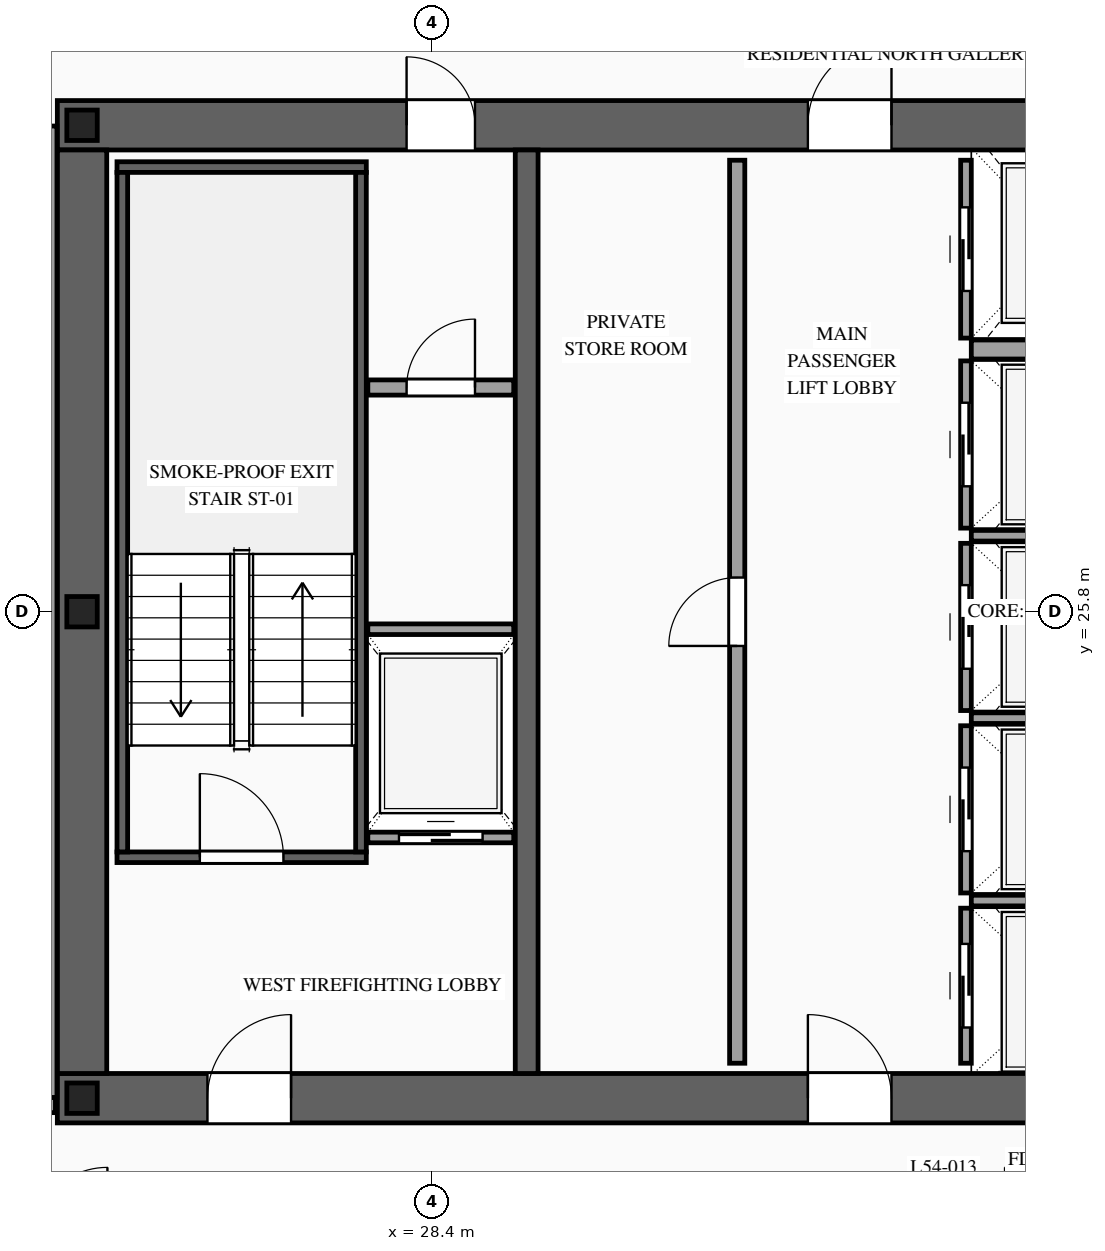
"""IFC4 building model, lengths in metres.
Left out: names, types, materials, properties, quantities, classifications, styles, units other than length and angle.
Written with IfcOpenShell. Run it as: python <this file> out.ifc"""

import sys

from ifc_helpers import new_model, si_unit, direction, frame, frame_2d, origin, origin_2d, place, context, subcontext, project, spatial, rectangle, i_section, extrude, source, transform, mapped, element, fill, save


model = new_model("IFC4")
c1 = context("Model", 3, precision=1e-05, world=origin(), true_north=direction((0.0, 1.0)))
c2 = subcontext(c1, "Body", "Model", "MODEL_VIEW")
j1 = project(units=[si_unit("LENGTHUNIT", "METRE"), si_unit("PLANEANGLEUNIT", "RADIAN")], contexts=[c1])
p1 = place(None, origin())
s1 = spatial("IfcSite", under=j1, at=p1, CompositionType="ELEMENT")
p2 = place(p1, origin())
s2 = spatial("IfcBuilding", under=s1, at=p2, CompositionType="ELEMENT")
p3 = place(p2, frame((0.0, 0.0, 205.5)))
s3 = spatial("IfcBuildingStorey", under=s2, at=p3, CompositionType="ELEMENT", Elevation=205.5)
p4 = place(p3, frame((23.475, 19.4, 0.0), z_axis=(0.0, 0.0, 1.0), x_axis=(1.0, 0.0, 0.0)))
e1 = element("IfcWall", 1, at=p4, inside=s3, PredefinedType="SHEAR", context=c2, shape_type="SweptSolid", body=[
    extrude(rectangle(XDim=27.05, YDim=0.65, at=frame_2d((13.525, 0.0))), origin(), (0.0, 0.0, 1.0), 3.5),
])
p5 = place(p4, frame((1.975, 0.0, 0.0)))
e2 = element("IfcOpeningElement", 2, at=p5, cuts=e1, PredefinedType="OPENING", context=c2, shape_type="SweptSolid", body=[
    extrude(rectangle(XDim=1.1, YDim=2.2, at=frame_2d((0.55, 1.1))), frame((0.0, 0.34, 0.0), z_axis=(0.0, -1.0, 0.0), x_axis=(1.0, 0.0, 0.0)), (0.0, 0.0, 1.0), 0.68),
])
p6 = place(p4, frame((9.875, 0.0, 0.0)))
e3 = element("IfcOpeningElement", 3, at=p6, cuts=e1, PredefinedType="OPENING", context=c2, shape_type="SweptSolid", body=[
    extrude(rectangle(XDim=1.1, YDim=2.2, at=frame_2d((0.55, 1.1))), frame((0.0, 0.34, 0.0), z_axis=(0.0, -1.0, 0.0), x_axis=(1.0, 0.0, 0.0)), (0.0, 0.0, 1.0), 0.68),
])
p7 = place(p4, frame((23.075, 0.0, 0.0)))
e4 = element("IfcOpeningElement", 4, at=p7, cuts=e1, PredefinedType="OPENING", context=c2, shape_type="SweptSolid", body=[
    extrude(rectangle(XDim=1.1, YDim=2.2, at=frame_2d((0.55, 1.1))), frame((0.0, 0.34, 0.0), z_axis=(0.0, -1.0, 0.0), x_axis=(1.0, 0.0, 0.0)), (0.0, 0.0, 1.0), 0.68),
])
p8 = place(p4, frame((19.695, 0.0, 0.0)))
e5 = element("IfcOpeningElement", 5, at=p8, cuts=e1, PredefinedType="OPENING", context=c2, shape_type="SweptSolid", body=[
    extrude(rectangle(XDim=0.9, YDim=2.15, at=frame_2d((0.45, 1.075))), frame((0.0, 0.34, 0.0), z_axis=(0.0, -1.0, 0.0), x_axis=(1.0, 0.0, 0.0)), (0.0, 0.0, 1.0), 0.68),
])
p9 = place(p4, frame((18.255, 0.0, 0.0)))
e6 = element("IfcOpeningElement", 6, at=p9, cuts=e1, PredefinedType="OPENING", context=c2, shape_type="SweptSolid", body=[
    extrude(rectangle(XDim=0.9, YDim=2.15, at=frame_2d((0.45, 1.075))), frame((0.0, 0.34, 0.0), z_axis=(0.0, -1.0, 0.0), x_axis=(1.0, 0.0, 0.0)), (0.0, 0.0, 1.0), 0.68),
])
p10 = place(p3, frame((23.475, 32.2, 0.0), z_axis=(0.0, 0.0, 1.0), x_axis=(1.0, 0.0, 0.0)))
e7 = element("IfcWall", 7, at=p10, inside=s3, PredefinedType="SHEAR", context=c2, shape_type="SweptSolid", body=[
    extrude(rectangle(XDim=27.05, YDim=0.65, at=frame_2d((13.525, 0.0))), origin(), (0.0, 0.0, 1.0), 3.5),
])
p11 = place(p10, frame((4.595, 0.0, 0.0)))
e8 = element("IfcOpeningElement", 8, at=p11, cuts=e7, PredefinedType="OPENING", context=c2, shape_type="SweptSolid", body=[
    extrude(rectangle(XDim=0.9, YDim=2.15, at=frame_2d((0.45, 1.075))), frame((0.0, 0.34, 0.0), z_axis=(0.0, -1.0, 0.0), x_axis=(1.0, 0.0, 0.0)), (0.0, 0.0, 1.0), 0.68),
])
p12 = place(p10, frame((9.875, 0.0, 0.0)))
e9 = element("IfcOpeningElement", 9, at=p12, cuts=e7, PredefinedType="OPENING", context=c2, shape_type="SweptSolid", body=[
    extrude(rectangle(XDim=1.1, YDim=2.2, at=frame_2d((0.55, 1.1))), frame((0.0, 0.34, 0.0), z_axis=(0.0, -1.0, 0.0), x_axis=(1.0, 0.0, 0.0)), (0.0, 0.0, 1.0), 0.68),
])
p13 = place(p10, frame((15.725, 0.0, 0.0)))
e10 = element("IfcOpeningElement", 10, at=p13, cuts=e7, PredefinedType="OPENING", context=c2, shape_type="SweptSolid", body=[
    extrude(rectangle(XDim=1.1, YDim=2.2, at=frame_2d((0.55, 1.1))), frame((0.0, 0.34, 0.0), z_axis=(0.0, -1.0, 0.0), x_axis=(1.0, 0.0, 0.0)), (0.0, 0.0, 1.0), 0.68),
])
m1 = source(origin(), c2, "Body", "SweptSolid", [
    extrude(rectangle(XDim=12.15, YDim=0.65, at=frame_2d((6.075, 0.0))), origin(), (0.0, 0.0, 1.0), 3.5),
])
p14 = place(p3, frame((23.8, 19.725, 0.0), z_axis=(0.0, 0.0, 1.0), x_axis=(0.0, 1.0, 0.0)))
e11 = element("IfcWall", 11, at=p14, inside=s3, PredefinedType="SHEAR", context=c2, shape_type="MappedRepresentation", body=[
    mapped(m1, transform((0.0, 0.0, 0.0), scale=1.0)),
])
m2 = source(origin(), c2, "Body", "SweptSolid", [
    extrude(rectangle(XDim=12.15, YDim=0.3, at=frame_2d((6.075, 0.0))), origin(), (0.0, 0.0, 1.0), 3.5),
])
p15 = place(p3, frame((29.65, 19.725, 0.0), z_axis=(0.0, 0.0, 1.0), x_axis=(0.0, 1.0, 0.0)))
e12 = element("IfcWall", 12, at=p15, inside=s3, PredefinedType="SOLIDWALL", context=c2, shape_type="MappedRepresentation", body=[
    mapped(m2, transform((0.0, 0.0, 0.0), scale=1.0)),
])
m3 = source(origin(), c2, "Body", "SweptSolid", [
    extrude(i_section(OverallWidth=0.4, OverallDepth=0.4, WebThickness=0.013, FlangeThickness=0.021, at=origin_2d()), origin(), (0.0, 0.0, 1.0), 3.5),
])
for number, where, z_axis, x_axis in (
    (13, (23.8, 19.4, 0.0), (0.0, 0.0, 1.0), (1.0, 0.0, 0.0)),
    (14, (23.8, 25.8, 0.0), (0.0, 0.0, 1.0), (1.0, 0.0, 0.0)),
    (15, (23.8, 32.2, 0.0), (0.0, 0.0, 1.0), (1.0, 0.0, 0.0)),
):
    element("IfcColumn", number, at=place(p3, frame(where, z_axis=z_axis, x_axis=x_axis)), inside=s3, PredefinedType="COLUMN", context=c2, shape_type="MappedRepresentation", body=[
        mapped(m3, transform((0.0, 0.0, 0.0), scale=1.0)),
    ])
p16 = place(p3, frame((27.56, 22.83, 0.0), z_axis=(0.0, 0.0, 1.0), x_axis=(1.0, 0.0, 0.0)))
e16 = element("IfcWall", 16, at=p16, inside=s3, PredefinedType="SOLIDWALL", context=c2, shape_type="SweptSolid", body=[
    extrude(rectangle(XDim=1.92, YDim=0.14, at=frame_2d((0.96, 0.0))), origin(), (0.0, 0.0, 1.0), 3.28),
])
p17 = place(p16, frame((0.41, 0.0, 0.0)))
e17 = element("IfcOpeningElement", 17, at=p17, cuts=e16, PredefinedType="OPENING", context=c2, shape_type="SweptSolid", body=[
    extrude(rectangle(XDim=1.1, YDim=2.2, at=frame_2d((0.55, 1.1))), frame((0.0, 0.085, 0.0), z_axis=(0.0, -1.0, 0.0), x_axis=(1.0, 0.0, 0.0)), (0.0, 0.0, 1.0), 0.17),
])
m4 = source(origin(), c2, "Body", "SweptSolid", [
    extrude(rectangle(XDim=1.92, YDim=0.14, at=frame_2d((0.96, 0.0))), origin(), (0.0, 0.0, 1.0), 3.28),
])
p18 = place(p3, frame((27.56, 25.57, 0.0), z_axis=(0.0, 0.0, 1.0), x_axis=(1.0, 0.0, 0.0)))
e18 = element("IfcWall", 18, at=p18, inside=s3, PredefinedType="SOLIDWALL", context=c2, shape_type="MappedRepresentation", body=[
    mapped(m4, transform((0.0, 0.0, 0.0), scale=1.0)),
])
p19 = place(p3, frame((35.43, 19.86, 0.0), z_axis=(0.0, 0.0, 1.0), x_axis=(0.0, 1.0, 0.0)))
e19 = element("IfcWall", 19, at=p19, inside=s3, PredefinedType="SOLIDWALL", context=c2, shape_type="SweptSolid", body=[
    extrude(rectangle(XDim=2.04, YDim=0.14, at=frame_2d((1.02, 0.0))), origin(), (0.0, 0.0, 1.0), 3.28),
])
p20 = place(p19, frame((0.47, 0.0, 0.0)))
e20 = element("IfcOpeningElement", 20, at=p20, cuts=e19, PredefinedType="OPENING", context=c2, shape_type="SweptSolid", body=[
    extrude(rectangle(XDim=1.1, YDim=2.2, at=frame_2d((0.55, 1.1))), frame((0.0, 0.085, 0.0), z_axis=(0.0, -1.0, 0.0), x_axis=(1.0, 0.0, 0.0)), (0.0, 0.0, 1.0), 0.17),
])
m5 = source(origin(), c2, "Body", "SweptSolid", [
    extrude(rectangle(XDim=2.4, YDim=0.14, at=frame_2d((1.2, 0.0))), origin(), (0.0, 0.0, 1.0), 3.28),
])
p21 = place(p3, frame((35.5, 22.0, 0.0), z_axis=(0.0, 0.0, 1.0), x_axis=(1.0, 0.0, 0.0)))
e21 = element("IfcWall", 21, at=p21, inside=s3, PredefinedType="SOLIDWALL", context=c2, shape_type="MappedRepresentation", body=[
    mapped(m5, transform((0.0, 0.0, 0.0), scale=1.0)),
])
p22 = place(p3, frame((35.43, 22.1, 0.0), z_axis=(0.0, 0.0, 1.0), x_axis=(0.0, 1.0, 0.0)))
e22 = element("IfcWall", 22, at=p22, inside=s3, PredefinedType="SOLIDWALL", context=c2, shape_type="SweptSolid", body=[
    extrude(rectangle(XDim=2.2, YDim=0.14, at=frame_2d((1.1, 0.0))), origin(), (0.0, 0.0, 1.0), 3.28),
])
p23 = place(p22, frame((0.55, 0.0, 0.0)))
e23 = element("IfcOpeningElement", 23, at=p23, cuts=e22, PredefinedType="OPENING", context=c2, shape_type="SweptSolid", body=[
    extrude(rectangle(XDim=1.1, YDim=2.2, at=frame_2d((0.55, 1.1))), frame((0.0, 0.085, 0.0), z_axis=(0.0, -1.0, 0.0), x_axis=(1.0, 0.0, 0.0)), (0.0, 0.0, 1.0), 0.17),
])
p24 = place(p3, frame((35.5, 24.4, 0.0), z_axis=(0.0, 0.0, 1.0), x_axis=(1.0, 0.0, 0.0)))
e24 = element("IfcWall", 24, at=p24, inside=s3, PredefinedType="SOLIDWALL", context=c2, shape_type="MappedRepresentation", body=[
    mapped(m5, transform((0.0, 0.0, 0.0), scale=1.0)),
])
p25 = place(p3, frame((35.43, 24.5, 0.0), z_axis=(0.0, 0.0, 1.0), x_axis=(0.0, 1.0, 0.0)))
e25 = element("IfcWall", 25, at=p25, inside=s3, PredefinedType="SOLIDWALL", context=c2, shape_type="SweptSolid", body=[
    extrude(rectangle(XDim=2.2, YDim=0.14, at=frame_2d((1.1, 0.0))), origin(), (0.0, 0.0, 1.0), 3.28),
])
p26 = place(p25, frame((0.55, 0.0, 0.0)))
e26 = element("IfcOpeningElement", 26, at=p26, cuts=e25, PredefinedType="OPENING", context=c2, shape_type="SweptSolid", body=[
    extrude(rectangle(XDim=1.1, YDim=2.2, at=frame_2d((0.55, 1.1))), frame((0.0, 0.085, 0.0), z_axis=(0.0, -1.0, 0.0), x_axis=(1.0, 0.0, 0.0)), (0.0, 0.0, 1.0), 0.17),
])
p27 = place(p3, frame((35.5, 26.8, 0.0), z_axis=(0.0, 0.0, 1.0), x_axis=(1.0, 0.0, 0.0)))
e27 = element("IfcWall", 27, at=p27, inside=s3, PredefinedType="SOLIDWALL", context=c2, shape_type="MappedRepresentation", body=[
    mapped(m5, transform((0.0, 0.0, 0.0), scale=1.0)),
])
p28 = place(p3, frame((35.43, 26.9, 0.0), z_axis=(0.0, 0.0, 1.0), x_axis=(0.0, 1.0, 0.0)))
e28 = element("IfcWall", 28, at=p28, inside=s3, PredefinedType="SOLIDWALL", context=c2, shape_type="SweptSolid", body=[
    extrude(rectangle(XDim=2.2, YDim=0.14, at=frame_2d((1.1, 0.0))), origin(), (0.0, 0.0, 1.0), 3.28),
])
p29 = place(p28, frame((0.55, 0.0, 0.0)))
e29 = element("IfcOpeningElement", 29, at=p29, cuts=e28, PredefinedType="OPENING", context=c2, shape_type="SweptSolid", body=[
    extrude(rectangle(XDim=1.1, YDim=2.2, at=frame_2d((0.55, 1.1))), frame((0.0, 0.085, 0.0), z_axis=(0.0, -1.0, 0.0), x_axis=(1.0, 0.0, 0.0)), (0.0, 0.0, 1.0), 0.17),
])
p30 = place(p3, frame((35.43, 29.4, 0.0), z_axis=(0.0, 0.0, 1.0), x_axis=(0.0, 1.0, 0.0)))
e30 = element("IfcWall", 30, at=p30, inside=s3, PredefinedType="SOLIDWALL", context=c2, shape_type="SweptSolid", body=[
    extrude(rectangle(XDim=2.34, YDim=0.14, at=frame_2d((1.17, 0.0))), origin(), (0.0, 0.0, 1.0), 3.28),
])
p31 = place(p30, frame((0.62, 0.0, 0.0)))
e31 = element("IfcOpeningElement", 31, at=p31, cuts=e30, PredefinedType="OPENING", context=c2, shape_type="SweptSolid", body=[
    extrude(rectangle(XDim=1.1, YDim=2.2, at=frame_2d((0.55, 1.1))), frame((0.0, 0.085, 0.0), z_axis=(0.0, -1.0, 0.0), x_axis=(1.0, 0.0, 0.0)), (0.0, 0.0, 1.0), 0.17),
])
m6 = source(origin(), c2, "Body", "SweptSolid", [
    extrude(rectangle(XDim=2.4, YDim=0.25, at=frame_2d((1.2, 0.0))), origin(), (0.0, 0.0, 1.0), 3.28),
])
p32 = place(p3, frame((35.5, 29.25, 0.0), z_axis=(0.0, 0.0, 1.0), x_axis=(1.0, 0.0, 0.0)))
e32 = element("IfcWall", 32, at=p32, inside=s3, PredefinedType="SOLIDWALL", context=c2, shape_type="MappedRepresentation", body=[
    mapped(m6, transform((0.0, 0.0, 0.0), scale=1.0)),
])
p33 = place(p3, frame((24.26, 22.57, 0.0), z_axis=(0.0, 0.0, 1.0), x_axis=(1.0, 0.0, 0.0)))
e33 = element("IfcWall", 33, at=p33, inside=s3, PredefinedType="SOLIDWALL", context=c2, shape_type="SweptSolid", body=[
    extrude(rectangle(XDim=3.28, YDim=0.14, at=frame_2d((1.64, 0.0))), origin(), (0.0, 0.0, 1.0), 3.28),
])
p34 = place(p33, frame((1.09, 0.0, 0.0)))
e34 = element("IfcOpeningElement", 34, at=p34, cuts=e33, PredefinedType="OPENING", context=c2, shape_type="SweptSolid", body=[
    extrude(rectangle(XDim=1.1, YDim=2.2, at=frame_2d((0.55, 1.1))), frame((0.0, 0.085, 0.0), z_axis=(0.0, -1.0, 0.0), x_axis=(1.0, 0.0, 0.0)), (0.0, 0.0, 1.0), 0.17),
])
m7 = source(origin(), c2, "Body", "SweptSolid", [
    extrude(rectangle(XDim=3.28, YDim=0.14, at=frame_2d((1.64, 0.0))), origin(), (0.0, 0.0, 1.0), 3.28),
])
p35 = place(p3, frame((24.26, 31.65, 0.0), z_axis=(0.0, 0.0, 1.0), x_axis=(1.0, 0.0, 0.0)))
e35 = element("IfcWall", 35, at=p35, inside=s3, PredefinedType="SOLIDWALL", context=c2, shape_type="MappedRepresentation", body=[
    mapped(m7, transform((0.0, 0.0, 0.0), scale=1.0)),
])
m8 = source(origin(), c2, "Body", "SweptSolid", [
    extrude(rectangle(XDim=8.94, YDim=0.14, at=frame_2d((4.47, 0.0))), origin(), (0.0, 0.0, 1.0), 3.28),
])
for number, where, z_axis, x_axis in (
    (36, (24.33, 22.64, 0.0), (0.0, 0.0, 1.0), (0.0, 1.0, 0.0)),
    (37, (27.47, 22.64, 0.0), (0.0, 0.0, 1.0), (0.0, 1.0, 0.0)),
):
    element("IfcWall", number, at=place(p3, frame(where, z_axis=z_axis, x_axis=x_axis)), inside=s3, PredefinedType="SOLIDWALL", context=c2, shape_type="MappedRepresentation", body=[
        mapped(m8, transform((0.0, 0.0, 0.0), scale=1.0)),
    ])
p36 = place(p3, frame((27.56, 28.75, 0.0), z_axis=(0.0, 0.0, 1.0), x_axis=(1.0, 0.0, 0.0)))
e38 = element("IfcWall", 38, at=p36, inside=s3, PredefinedType="PARTITIONING", context=c2, shape_type="SweptSolid", body=[
    extrude(rectangle(XDim=1.92, YDim=0.2, at=frame_2d((0.96, 0.0))), origin(), (0.0, 0.0, 1.0), 3.28),
])
p37 = place(p36, frame((0.51, 0.0, 0.0)))
e39 = element("IfcOpeningElement", 39, at=p37, cuts=e38, PredefinedType="OPENING", context=c2, shape_type="SweptSolid", body=[
    extrude(rectangle(XDim=0.9, YDim=2.15, at=frame_2d((0.45, 1.075))), frame((0.0, 0.115, 0.0), z_axis=(0.0, -1.0, 0.0), x_axis=(1.0, 0.0, 0.0)), (0.0, 0.0, 1.0), 0.23),
])
p38 = place(p3, frame((32.42, 19.86, 0.0), z_axis=(0.0, 0.0, 1.0), x_axis=(0.0, 1.0, 0.0)))
e40 = element("IfcWall", 40, at=p38, inside=s3, PredefinedType="PARTITIONING", context=c2, shape_type="SweptSolid", body=[
    extrude(rectangle(XDim=11.88, YDim=0.2, at=frame_2d((5.94, 0.0))), origin(), (0.0, 0.0, 1.0), 3.28),
])
p39 = place(p38, frame((5.49, 0.0, 0.0)))
e41 = element("IfcOpeningElement", 41, at=p39, cuts=e40, PredefinedType="OPENING", context=c2, shape_type="SweptSolid", body=[
    extrude(rectangle(XDim=0.9, YDim=2.15, at=frame_2d((0.45, 1.075))), frame((0.0, 0.115, 0.0), z_axis=(0.0, -1.0, 0.0), x_axis=(1.0, 0.0, 0.0)), (0.0, 0.0, 1.0), 0.23),
])
m9 = source(origin(), c2, "Body", "SweptSolid", [
    extrude(rectangle(XDim=8.4, YDim=0.2, at=frame_2d((4.2, 0.0))), origin(), (0.0, 0.0, 1.0), 2.775),
])
p40 = place(p3, frame((15.05, 19.31, 0.0), z_axis=(0.0, 0.0, 1.0), x_axis=(1.0, 0.0, 0.0)))
e42 = element("IfcWall", 42, at=p40, inside=s3, PredefinedType="PARTITIONING", context=c2, shape_type="MappedRepresentation", body=[
    mapped(m9, transform((0.0, 0.0, 0.0), scale=1.0)),
])
m10 = source(origin(), c2, "Body", "SweptSolid", [
    extrude(rectangle(XDim=12.78, YDim=0.2, at=frame_2d((6.39, 0.0))), origin(), (0.0, 0.0, 1.0), 3.28),
])
p41 = place(p3, frame((23.37, 19.41, 0.0), z_axis=(0.0, 0.0, 1.0), x_axis=(0.0, 1.0, 0.0)))
e43 = element("IfcWall", 43, at=p41, inside=s3, PredefinedType="PARTITIONING", context=c2, shape_type="MappedRepresentation", body=[
    mapped(m10, transform((0.0, 0.0, 0.0), scale=1.0)),
])
m11 = source(origin(), c2, "Body", "SweptSolid", [
    extrude(rectangle(XDim=1.1, YDim=2.2, at=frame_2d((0.55, 1.1))), frame((0.0, 0.025, 0.0), z_axis=(0.0, -1.0, 0.0), x_axis=(1.0, 0.0, 0.0)), (0.0, 0.0, 1.0), 0.05),
])
p42 = place(p17, origin())
e44 = element("IfcDoor", 44, at=p42, inside=s3, OperationType="SLIDING_TO_LEFT", PredefinedType="DOOR", context=c2, shape_type="MappedRepresentation", body=[
    mapped(m11, transform((0.0, 0.0, 0.0), scale=1.0)),
])
fill(e17, e44)
p43 = place(p20, origin())
e45 = element("IfcDoor", 45, at=p43, inside=s3, OperationType="SLIDING_TO_RIGHT", PredefinedType="DOOR", context=c2, shape_type="MappedRepresentation", body=[
    mapped(m11, transform((0.0, 0.0, 0.0), scale=1.0)),
])
fill(e20, e45)
p44 = place(p23, origin())
e46 = element("IfcDoor", 46, at=p44, inside=s3, OperationType="SLIDING_TO_LEFT", PredefinedType="DOOR", context=c2, shape_type="MappedRepresentation", body=[
    mapped(m11, transform((0.0, 0.0, 0.0), scale=1.0)),
])
fill(e23, e46)
p45 = place(p26, origin())
e47 = element("IfcDoor", 47, at=p45, inside=s3, OperationType="SLIDING_TO_RIGHT", PredefinedType="DOOR", context=c2, shape_type="MappedRepresentation", body=[
    mapped(m11, transform((0.0, 0.0, 0.0), scale=1.0)),
])
fill(e26, e47)
p46 = place(p29, origin())
e48 = element("IfcDoor", 48, at=p46, inside=s3, OperationType="SLIDING_TO_LEFT", PredefinedType="DOOR", context=c2, shape_type="MappedRepresentation", body=[
    mapped(m11, transform((0.0, 0.0, 0.0), scale=1.0)),
])
fill(e29, e48)
p47 = place(p31, origin())
e49 = element("IfcDoor", 49, at=p47, inside=s3, OperationType="SLIDING_TO_RIGHT", PredefinedType="DOOR", context=c2, shape_type="MappedRepresentation", body=[
    mapped(m11, transform((0.0, 0.0, 0.0), scale=1.0)),
])
fill(e31, e49)
m12 = source(origin(), c2, "Body", "SweptSolid", [
    extrude(rectangle(XDim=1.1, YDim=2.2, at=frame_2d((0.55, 1.1))), frame((0.0, 0.025, 0.0), z_axis=(0.0, -1.0, 0.0), x_axis=(1.0, 0.0, 0.0)), (0.0, 0.0, 1.0), 0.05),
])
p48 = place(p34, origin())
e50 = element("IfcDoor", 50, at=p48, inside=s3, OperationType="SINGLE_SWING_LEFT", PredefinedType="DOOR", context=c2, shape_type="MappedRepresentation", body=[
    mapped(m12, transform((0.0, 0.0, 0.0), scale=1.0)),
])
fill(e34, e50)
p49 = place(p5, origin())
e51 = element("IfcDoor", 51, at=p49, inside=s3, OperationType="SINGLE_SWING_RIGHT", PredefinedType="DOOR", context=c2, shape_type="MappedRepresentation", body=[
    mapped(m12, transform((0.0, 0.0, 0.0), scale=1.0)),
])
fill(e2, e51)
p50 = place(p6, origin())
e52 = element("IfcDoor", 52, at=p50, inside=s3, OperationType="SINGLE_SWING_LEFT", PredefinedType="DOOR", context=c2, shape_type="MappedRepresentation", body=[
    mapped(m12, transform((0.0, 0.0, 0.0), scale=1.0)),
])
fill(e3, e52)
m13 = source(origin(), c2, "Body", "SweptSolid", [
    extrude(rectangle(XDim=0.9, YDim=2.15, at=frame_2d((0.45, 1.075))), frame((0.0, 0.025, 0.0), z_axis=(0.0, -1.0, 0.0), x_axis=(1.0, 0.0, 0.0)), (0.0, 0.0, 1.0), 0.05),
])
p51 = place(p11, origin())
e53 = element("IfcDoor", 53, at=p51, inside=s3, OperationType="SINGLE_SWING_LEFT", PredefinedType="DOOR", context=c2, shape_type="MappedRepresentation", body=[
    mapped(m13, transform((0.0, 0.0, 0.0), scale=1.0)),
])
fill(e8, e53)
p52 = place(p12, origin())
e54 = element("IfcDoor", 54, at=p52, inside=s3, OperationType="SINGLE_SWING_RIGHT", PredefinedType="DOOR", context=c2, shape_type="MappedRepresentation", body=[
    mapped(m12, transform((0.0, 0.0, 0.0), scale=1.0)),
])
fill(e9, e54)
p53 = place(p37, origin())
e55 = element("IfcDoor", 55, at=p53, inside=s3, OperationType="SINGLE_SWING_RIGHT", PredefinedType="DOOR", context=c2, shape_type="MappedRepresentation", body=[
    mapped(m13, transform((0.0, 0.0, 0.0), scale=1.0)),
])
fill(e39, e55)
p54 = place(p39, origin())
e56 = element("IfcDoor", 56, at=p54, inside=s3, OperationType="SINGLE_SWING_LEFT", PredefinedType="DOOR", context=c2, shape_type="MappedRepresentation", body=[
    mapped(m13, transform((0.0, 0.0, 0.0), scale=1.0)),
])
fill(e41, e56)
save(model, sys.argv[1])
